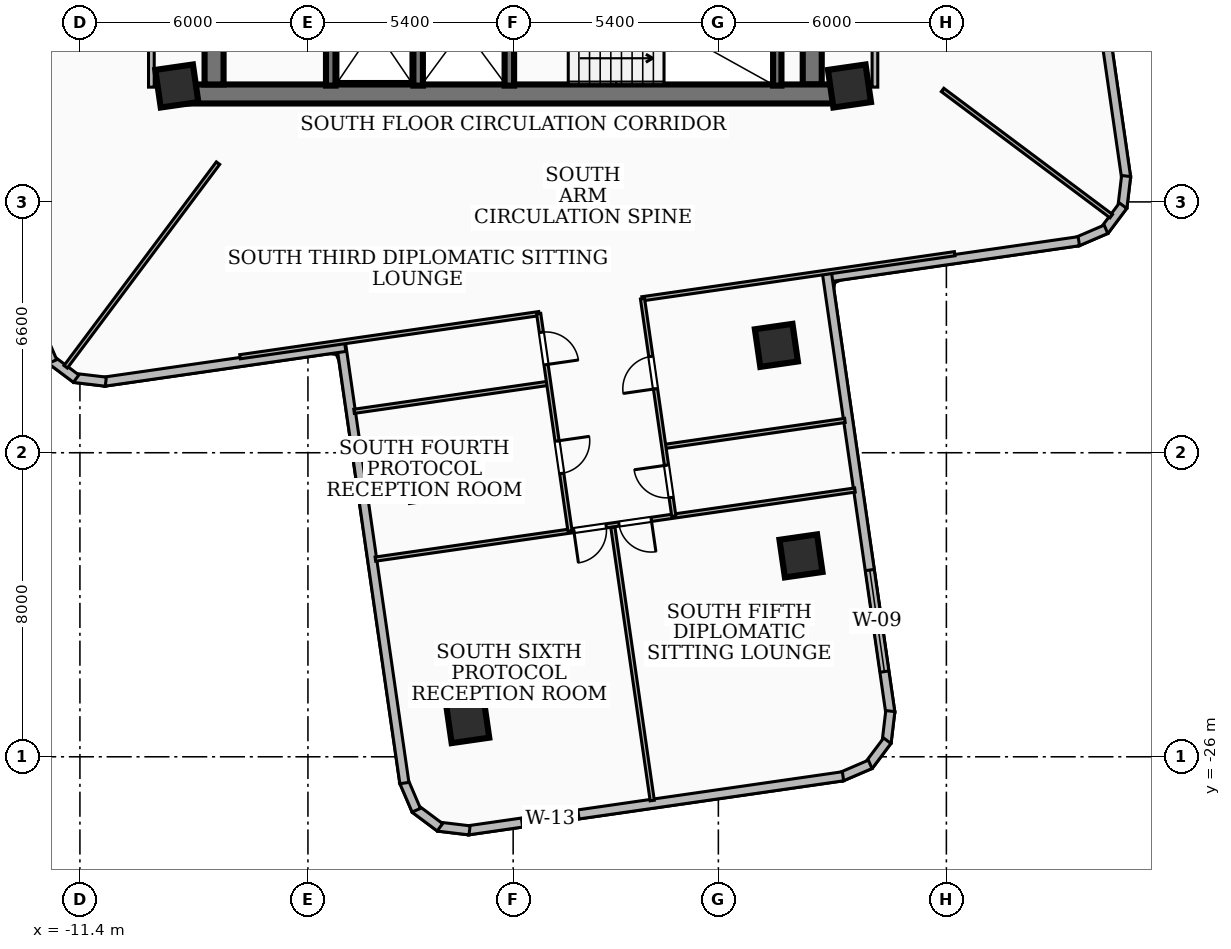
"""IFC4 building model, lengths in metres.
Left out: names, types, materials, properties, quantities, classifications, styles, units other than length and angle.
Written with IfcOpenShell. Run it as: python <this file> out.ifc"""

import sys

from ifc_helpers import new_model, si_unit, direction, frame, frame_2d, origin, origin_2d, place, context, subcontext, project, spatial, rectangle, extrude, element, fill, save


model = new_model("IFC4")
c1 = context("Model", 3, precision=1e-05, world=origin(), true_north=direction((0.0, 1.0)))
c2 = subcontext(c1, "Body", "Model", "MODEL_VIEW")
j1 = project(units=[si_unit("LENGTHUNIT", "METRE"), si_unit("PLANEANGLEUNIT", "RADIAN")], contexts=[c1])
p1 = place(None, origin())
s1 = spatial("IfcSite", under=j1, at=p1, CompositionType="ELEMENT")
p2 = place(p1, origin())
s2 = spatial("IfcBuilding", under=s1, at=p2, CompositionType="ELEMENT")
p3 = place(p2, frame((0.0, 0.0, 89.28)))
s3 = spatial("IfcBuildingStorey", under=s2, at=p3, CompositionType="ELEMENT", Elevation=89.28)
p4 = place(p3, frame((8.78, -8.56, 0.0), z_axis=(0.0, 0.0, 1.0), x_axis=(-1.0, 0.0, 0.0)))
e1 = element("IfcWall", 1, at=p4, inside=s3, PredefinedType="SHEAR", context=c2, shape_type="SweptSolid", body=[
    extrude(rectangle(XDim=17.56, YDim=0.5, at=frame_2d((8.78, 0.0))), origin(), (0.0, 0.0, 1.0), 3.34),
])
for number, where, z_axis, x_axis in (
    (2, (-7.87, -8.31, 0.0), (0.0, 0.0, 1.0), (0.0, 1.0, 0.0)),
    (3, (7.87, -2.0, 0.0), (0.0, 0.0, 1.0), (0.0, -1.0, 0.0)),
):
    element("IfcWall", number, at=place(p3, frame(where, z_axis=z_axis, x_axis=x_axis)), inside=s3, PredefinedType="SHEAR", context=c2, shape_type="SweptSolid", body=[
        extrude(rectangle(XDim=6.31, YDim=0.5, at=frame_2d((3.155, 0.0))), origin(), (0.0, 0.0, 1.0), 3.34),
    ])
p5 = place(p3, frame((6.95, -8.34, 0.0), z_axis=(0.0, 0.0, 1.0), x_axis=(0.0, 1.0, 0.0)))
e4 = element("IfcWall", 4, at=p5, inside=s3, PredefinedType="SOLIDWALL", context=c2, shape_type="SweptSolid", body=[
    extrude(rectangle(XDim=3.06, YDim=0.22, at=frame_2d((1.53, 0.0))), origin(), (0.0, 0.0, 1.0), 3.34),
])
for number, where, z_axis, x_axis in (
    (5, (-0.1, -8.34, 0.0), (0.0, 0.0, 1.0), (0.0, 1.0, 0.0)),
    (6, (-2.5, -8.34, 0.0), (0.0, 0.0, 1.0), (0.0, 1.0, 0.0)),
    (7, (-4.8, -8.34, 0.0), (0.0, 0.0, 1.0), (0.0, 1.0, 0.0)),
):
    element("IfcWall", number, at=place(p3, frame(where, z_axis=z_axis, x_axis=x_axis)), inside=s3, PredefinedType="SOLIDWALL", context=c2, shape_type="SweptSolid", body=[
        extrude(rectangle(XDim=3.04, YDim=0.25, at=frame_2d((1.52, 0.0))), origin(), (0.0, 0.0, 1.0), 3.34),
    ])
for number, where, z_axis, x_axis in (
    (8, (8.85, -8.35, 0.0), (0.0, 0.0, 1.0), (0.99, 0.143, 0.0)),
    (9, (-8.85, -8.35, 0.0), (0.0, 0.0, 1.0), (0.99, 0.143, 0.0)),
    (10, (-2.271, -18.724, 0.0), (0.0, 0.0, 1.0), (0.99, 0.143, 0.0)),
    (11, (6.927, -15.175, 0.0), (0.0, 0.0, 1.0), (0.99, 0.143, 0.0)),
    (12, (-1.195, -25.074, 0.0), (0.0, 0.0, 1.0), (0.99, 0.143, 0.0)),
    (13, (7.574, -20.714, 0.0), (0.0, 0.0, 1.0), (0.99, 0.143, 0.0)),
):
    element("IfcColumn", number, at=place(p3, frame(where, z_axis=z_axis, x_axis=x_axis)), inside=s3, PredefinedType="COLUMN", context=c2, shape_type="SweptSolid", body=[
        extrude(rectangle(XDim=1.0, YDim=1.0, at=origin_2d()), origin(), (0.0, 0.0, 1.0), 3.6),
    ])
p6 = place(p3, frame((15.215, -4.419, 0.0), z_axis=(0.0, 0.0, 1.0), x_axis=(0.14277438433, -0.989755260243, 0.0)))
e14 = element("IfcWall", 14, at=p6, inside=s3, PredefinedType="SOLIDWALL", context=c2, shape_type="SweptSolid", body=[
    extrude(rectangle(XDim=6.416, YDim=0.24, at=frame_2d((3.208, 0.0))), origin(), (0.0, 0.0, 1.0), 3.34),
])
p7 = place(p3, frame((16.13, -10.719, 0.0), z_axis=(0.0, 0.0, 1.0), x_axis=(-0.117847211411, -0.993031739051, 0.0)))
e15 = element("IfcWall", 15, at=p7, inside=s3, PredefinedType="SOLIDWALL", context=c2, shape_type="SweptSolid", body=[
    extrude(rectangle(XDim=0.831, YDim=0.24, at=frame_2d((0.416, 0.0))), origin(), (0.0, 0.0, 1.0), 3.34),
])
p8 = place(p3, frame((16.05, -11.499, 0.0), z_axis=(0.0, 0.0, 1.0), x_axis=(-0.599903963027, -0.800072018724, 0.0)))
e16 = element("IfcWall", 16, at=p8, inside=s3, PredefinedType="SOLIDWALL", context=c2, shape_type="SweptSolid", body=[
    extrude(rectangle(XDim=0.813, YDim=0.24, at=frame_2d((0.407, 0.0))), origin(), (0.0, 0.0, 1.0), 3.34),
])
p9 = place(p3, frame((15.6, -12.12, 0.0), z_axis=(0.0, 0.0, 1.0), x_axis=(-0.918795004047, -0.394735025731, 0.0)))
e17 = element("IfcWall", 17, at=p9, inside=s3, PredefinedType="SOLIDWALL", context=c2, shape_type="SweptSolid", body=[
    extrude(rectangle(XDim=0.831, YDim=0.24, at=frame_2d((0.415, 0.0))), origin(), (0.0, 0.0, 1.0), 3.34),
])
p10 = place(p3, frame((14.885, -12.434, 0.0), z_axis=(0.0, 0.0, 1.0), x_axis=(-0.989767068769, -0.142692500085, 0.0)))
e18 = element("IfcWall", 18, at=p10, inside=s3, PredefinedType="SOLIDWALL", context=c2, shape_type="SweptSolid", body=[
    extrude(rectangle(XDim=6.775, YDim=0.24, at=frame_2d((3.388, 0.0))), origin(), (0.0, 0.0, 1.0), 3.34),
])
p11 = place(p3, frame((8.26, -13.292, 0.0), z_axis=(0.0, 0.0, 1.0), x_axis=(0.142694701612, -0.989766751377, 0.0)))
e19 = element("IfcWall", 19, at=p11, inside=s3, PredefinedType="SOLIDWALL", context=c2, shape_type="SweptSolid", body=[
    extrude(rectangle(XDim=11.675, YDim=0.24, at=frame_2d((5.838, 0.0))), origin(), (0.0, 0.0, 1.0), 3.34),
])
p12 = place(p11, frame((7.875, 0.0, 0.85)))
e20 = element("IfcOpeningElement", 20, at=p12, cuts=e19, PredefinedType="OPENING", context=c2, shape_type="SweptSolid", body=[
    extrude(rectangle(XDim=2.7, YDim=1.65, at=frame_2d((1.35, 0.825))), frame((0.0, 0.13, 0.0), z_axis=(0.0, -1.0, 0.0), x_axis=(1.0, 0.0, 0.0)), (0.0, 0.0, 1.0), 0.26),
])
p13 = place(p3, frame((9.925, -24.798, 0.0), z_axis=(0.0, 0.0, 1.0), x_axis=(-0.118136998224, -0.992997305963, 0.0)))
e21 = element("IfcWall", 21, at=p13, inside=s3, PredefinedType="SOLIDWALL", context=c2, shape_type="SweptSolid", body=[
    extrude(rectangle(XDim=0.831, YDim=0.24, at=frame_2d((0.416, 0.0))), origin(), (0.0, 0.0, 1.0), 3.34),
])
p14 = place(p3, frame((9.845, -25.578, 0.0), z_axis=(0.0, 0.0, 1.0), x_axis=(-0.599759949003, -0.800179981986, 0.0)))
e22 = element("IfcWall", 22, at=p14, inside=s3, PredefinedType="SOLIDWALL", context=c2, shape_type="SweptSolid", body=[
    extrude(rectangle(XDim=0.814, YDim=0.24, at=frame_2d((0.407, 0.0))), origin(), (0.0, 0.0, 1.0), 3.34),
])
p15 = place(p3, frame((9.395, -26.199, 0.0), z_axis=(0.0, 0.0, 1.0), x_axis=(-0.91864251547, -0.395089773053, 0.0)))
e23 = element("IfcWall", 23, at=p15, inside=s3, PredefinedType="SOLIDWALL", context=c2, shape_type="SweptSolid", body=[
    extrude(rectangle(XDim=0.831, YDim=0.24, at=frame_2d((0.415, 0.0))), origin(), (0.0, 0.0, 1.0), 3.34),
])
p16 = place(p3, frame((8.68, -26.513, 0.0), z_axis=(0.0, 0.0, 1.0), x_axis=(-0.98976517122, -0.142705661552, 0.0)))
e24 = element("IfcWall", 24, at=p16, inside=s3, PredefinedType="SOLIDWALL", context=c2, shape_type="SweptSolid", body=[
    extrude(rectangle(XDim=9.979, YDim=0.24, at=frame_2d((4.99, 0.0))), origin(), (0.0, 0.0, 1.0), 3.34),
])
p17 = place(p16, frame((7.034, 0.0, 0.85)))
e25 = element("IfcOpeningElement", 25, at=p17, cuts=e24, PredefinedType="OPENING", context=c2, shape_type="SweptSolid", body=[
    extrude(rectangle(XDim=1.5, YDim=1.8, at=frame_2d((0.75, 0.9))), frame((0.0, 0.13, 0.0), z_axis=(0.0, -1.0, 0.0), x_axis=(1.0, 0.0, 0.0)), (0.0, 0.0, 1.0), 0.26),
])
p18 = place(p3, frame((-1.147, -27.936, 0.0), z_axis=(0.0, 0.0, 1.0), x_axis=(-0.992858752215, 0.119295842971, 0.0)))
e26 = element("IfcWall", 26, at=p18, inside=s3, PredefinedType="SOLIDWALL", context=c2, shape_type="SweptSolid", body=[
    extrude(rectangle(XDim=0.831, YDim=0.24, at=frame_2d((0.416, 0.0))), origin(), (0.0, 0.0, 1.0), 3.34),
])
p19 = place(p3, frame((-1.927, -27.855, 0.0), z_axis=(0.0, 0.0, 1.0), x_axis=(-0.801186263659, 0.598415049045, 0.0)))
e27 = element("IfcWall", 27, at=p19, inside=s3, PredefinedType="SOLIDWALL", context=c2, shape_type="SweptSolid", body=[
    extrude(rectangle(XDim=0.814, YDim=0.24, at=frame_2d((0.407, 0.0))), origin(), (0.0, 0.0, 1.0), 3.34),
])
p20 = place(p3, frame((-2.549, -27.406, 0.0), z_axis=(0.0, 0.0, 1.0), x_axis=(-0.393848299024, 0.919175455153, 0.0)))
e28 = element("IfcWall", 28, at=p20, inside=s3, PredefinedType="SOLIDWALL", context=c2, shape_type="SweptSolid", body=[
    extrude(rectangle(XDim=0.83, YDim=0.24, at=frame_2d((0.415, 0.0))), origin(), (0.0, 0.0, 1.0), 3.34),
])
p21 = place(p3, frame((-2.862, -26.691, 0.0), z_axis=(0.0, 0.0, 1.0), x_axis=(-0.142682889326, 0.989768454283, 0.0)))
e29 = element("IfcWall", 29, at=p21, inside=s3, PredefinedType="SOLIDWALL", context=c2, shape_type="SweptSolid", body=[
    extrude(rectangle(XDim=11.676, YDim=0.24, at=frame_2d((5.838, 0.0))), origin(), (0.0, 0.0, 1.0), 2.486),
])
p22 = place(p3, frame((-4.419, -15.215, 0.0), z_axis=(0.0, 0.0, 1.0), x_axis=(-0.989755260243, -0.14277438433, 0.0)))
e30 = element("IfcWall", 30, at=p22, inside=s3, PredefinedType="SOLIDWALL", context=c2, shape_type="SweptSolid", body=[
    extrude(rectangle(XDim=6.416, YDim=0.24, at=frame_2d((3.208, 0.0))), origin(), (0.0, 0.0, 1.0), 2.486),
])
p23 = place(p3, frame((-10.719, -16.13, 0.0), z_axis=(0.0, 0.0, 1.0), x_axis=(-0.993031739051, 0.117847211411, 0.0)))
e31 = element("IfcWall", 31, at=p23, inside=s3, PredefinedType="SOLIDWALL", context=c2, shape_type="SweptSolid", body=[
    extrude(rectangle(XDim=0.831, YDim=0.24, at=frame_2d((0.416, 0.0))), origin(), (0.0, 0.0, 1.0), 3.34),
])
p24 = place(p3, frame((-11.499, -16.05, 0.0), z_axis=(0.0, 0.0, 1.0), x_axis=(-0.800072018724, 0.599903963027, 0.0)))
e32 = element("IfcWall", 32, at=p24, inside=s3, PredefinedType="SOLIDWALL", context=c2, shape_type="SweptSolid", body=[
    extrude(rectangle(XDim=0.813, YDim=0.24, at=frame_2d((0.407, 0.0))), origin(), (0.0, 0.0, 1.0), 3.34),
])
p25 = place(p3, frame((-12.12, -15.6, 0.0), z_axis=(0.0, 0.0, 1.0), x_axis=(-0.394735025731, 0.918795004047, 0.0)))
e33 = element("IfcWall", 33, at=p25, inside=s3, PredefinedType="SOLIDWALL", context=c2, shape_type="SweptSolid", body=[
    extrude(rectangle(XDim=0.831, YDim=0.24, at=frame_2d((0.415, 0.0))), origin(), (0.0, 0.0, 1.0), 3.34),
])
for number, where, z_axis, x_axis in (
    (34, (-9.52, -8.38, 0.0), (0.0, 0.0, 1.0), (0.0, 1.0, 0.0)),
    (35, (9.52, -8.38, 0.0), (0.0, 0.0, 1.0), (0.0, 1.0, 0.0)),
):
    element("IfcWall", number, at=place(p3, frame(where, z_axis=z_axis, x_axis=x_axis)), inside=s3, PredefinedType="PARTITIONING", context=c2, shape_type="SweptSolid", body=[
        extrude(rectangle(XDim=6.63, YDim=0.15, at=frame_2d((3.315, 0.0))), origin(), (0.0, 0.0, 1.0), 2.486),
    ])
p26 = place(p3, frame((-7.766, -10.38, 0.0), z_axis=(0.0, 0.0, 1.0), x_axis=(-0.598966195252, -0.800774310867, 0.0)))
e36 = element("IfcWall", 36, at=p26, inside=s3, PredefinedType="PARTITIONING", context=c2, shape_type="SweptSolid", body=[
    extrude(rectangle(XDim=6.691, YDim=0.11, at=frame_2d((3.346, 0.0))), origin(), (0.0, 0.0, 1.0), 2.644),
])
p27 = place(p3, frame((11.3, -8.454, 0.0), z_axis=(0.0, 0.0, 1.0), x_axis=(0.80074999449, -0.598998703107, 0.0)))
e37 = element("IfcWall", 37, at=p27, inside=s3, PredefinedType="PARTITIONING", context=c2, shape_type="SweptSolid", body=[
    extrude(rectangle(XDim=5.542, YDim=0.11, at=frame_2d((2.771, 0.0))), origin(), (0.0, 0.0, 1.0), 3.34),
])
p28 = place(p3, frame((3.394, -13.949, 0.0), z_axis=(0.0, 0.0, 1.0), x_axis=(0.989762369657, 0.142725091033, 0.0)))
e38 = element("IfcWall", 38, at=p28, inside=s3, PredefinedType="PARTITIONING", context=c2, shape_type="SweptSolid", body=[
    extrude(rectangle(XDim=8.31, YDim=0.11, at=frame_2d((4.155, 0.0))), origin(), (0.0, 0.0, 1.0), 2.486),
])
p29 = place(p3, frame((-7.186, -15.474, 0.0), z_axis=(0.0, 0.0, 1.0), x_axis=(0.989754461648, 0.142779920322, 0.0)))
e39 = element("IfcWall", 39, at=p29, inside=s3, PredefinedType="PARTITIONING", context=c2, shape_type="SweptSolid", body=[
    extrude(rectangle(XDim=7.949, YDim=0.11, at=frame_2d((3.975, 0.0))), origin(), (0.0, 0.0, 1.0), 2.486),
])
p30 = place(p3, frame((3.984, -17.834, 0.0), z_axis=(0.0, 0.0, 1.0), x_axis=(0.989771535394, 0.142661514515, 0.0)))
e40 = element("IfcWall", 40, at=p30, inside=s3, PredefinedType="PARTITIONING", context=c2, shape_type="SweptSolid", body=[
    extrude(rectangle(XDim=4.795, YDim=0.11, at=frame_2d((2.397, 0.0))), origin(), (0.0, 0.0, 1.0), 2.486),
])
p31 = place(p3, frame((-4.186, -16.91, 0.0), z_axis=(0.0, 0.0, 1.0), x_axis=(0.989785908973, 0.142561756436, 0.0)))
e41 = element("IfcWall", 41, at=p31, inside=s3, PredefinedType="PARTITIONING", context=c2, shape_type="SweptSolid", body=[
    extrude(rectangle(XDim=5.155, YDim=0.11, at=frame_2d((2.577, 0.0))), origin(), (0.0, 0.0, 1.0), 2.486),
])
p32 = place(p3, frame((4.228, -19.668, 0.0), z_axis=(0.0, 0.0, 1.0), x_axis=(-0.142556647725, 0.989786644782, 0.0)))
e42 = element("IfcWall", 42, at=p32, inside=s3, PredefinedType="PARTITIONING", context=c2, shape_type="SweptSolid", body=[
    extrude(rectangle(XDim=5.78, YDim=0.11, at=frame_2d((2.89, 0.0))), origin(), (0.0, 0.0, 1.0), 3.34),
])
p33 = place(p32, frame((3.385, 0.0, 0.0)))
e43 = element("IfcOpeningElement", 43, at=p33, cuts=e42, PredefinedType="OPENING", context=c2, shape_type="SweptSolid", body=[
    extrude(rectangle(XDim=0.86, YDim=2.04, at=frame_2d((0.43, 1.02))), frame((0.0, 0.065, 0.0), z_axis=(0.0, -1.0, 0.0), x_axis=(1.0, 0.0, 0.0)), (0.0, 0.0, 1.0), 0.13),
])
p34 = place(p32, frame((0.495, 0.0, 0.0)))
e44 = element("IfcOpeningElement", 44, at=p34, cuts=e42, PredefinedType="OPENING", context=c2, shape_type="SweptSolid", body=[
    extrude(rectangle(XDim=0.86, YDim=2.04, at=frame_2d((0.43, 1.02))), frame((0.0, 0.065, 0.0), z_axis=(0.0, -1.0, 0.0), x_axis=(1.0, 0.0, 0.0)), (0.0, 0.0, 1.0), 0.13),
])
p35 = place(p3, frame((0.672, -14.341, 0.0), z_axis=(0.0, 0.0, 1.0), x_axis=(0.142722164178, -0.989762791709, 0.0)))
e45 = element("IfcWall", 45, at=p35, inside=s3, PredefinedType="PARTITIONING", context=c2, shape_type="SweptSolid", body=[
    extrude(rectangle(XDim=5.78, YDim=0.11, at=frame_2d((2.89, 0.0))), origin(), (0.0, 0.0, 1.0), 3.34),
])
p36 = place(p35, frame((0.495, 0.0, 0.0)))
e46 = element("IfcOpeningElement", 46, at=p36, cuts=e45, PredefinedType="OPENING", context=c2, shape_type="SweptSolid", body=[
    extrude(rectangle(XDim=0.86, YDim=2.04, at=frame_2d((0.43, 1.02))), frame((0.0, 0.065, 0.0), z_axis=(0.0, -1.0, 0.0), x_axis=(1.0, 0.0, 0.0)), (0.0, 0.0, 1.0), 0.13),
])
p37 = place(p35, frame((3.385, 0.0, 0.0)))
e47 = element("IfcOpeningElement", 47, at=p37, cuts=e45, PredefinedType="OPENING", context=c2, shape_type="SweptSolid", body=[
    extrude(rectangle(XDim=0.86, YDim=2.04, at=frame_2d((0.43, 1.02))), frame((0.0, 0.065, 0.0), z_axis=(0.0, -1.0, 0.0), x_axis=(1.0, 0.0, 0.0)), (0.0, 0.0, 1.0), 0.13),
])
p38 = place(p3, frame((2.624, -19.96, 0.0), z_axis=(0.0, 0.0, 1.0), x_axis=(0.142583297559, -0.989782806103, 0.0)))
e48 = element("IfcWall", 48, at=p38, inside=s3, PredefinedType="PARTITIONING", context=c2, shape_type="SweptSolid", body=[
    extrude(rectangle(XDim=7.265, YDim=0.11, at=frame_2d((3.633, 0.0))), origin(), (0.0, 0.0, 1.0), 2.832),
])
p39 = place(p3, frame((8.994, -18.981, 0.0), z_axis=(0.0, 0.0, 1.0), x_axis=(-0.989779502996, -0.14260622514, 0.0)))
e49 = element("IfcWall", 49, at=p39, inside=s3, PredefinedType="PARTITIONING", context=c2, shape_type="SweptSolid", body=[
    extrude(rectangle(XDim=12.749, YDim=0.11, at=frame_2d((6.375, 0.0))), origin(), (0.0, 0.0, 1.0), 2.486),
])
p40 = place(p39, frame((6.615, 0.0, 0.0)))
e50 = element("IfcOpeningElement", 50, at=p40, cuts=e49, PredefinedType="OPENING", context=c2, shape_type="SweptSolid", body=[
    extrude(rectangle(XDim=0.86, YDim=2.04, at=frame_2d((0.43, 1.02))), frame((0.0, 0.065, 0.0), z_axis=(0.0, -1.0, 0.0), x_axis=(1.0, 0.0, 0.0)), (0.0, 0.0, 1.0), 0.13),
])
p41 = place(p39, frame((5.415, 0.0, 0.0)))
e51 = element("IfcOpeningElement", 51, at=p41, cuts=e49, PredefinedType="OPENING", context=c2, shape_type="SweptSolid", body=[
    extrude(rectangle(XDim=0.86, YDim=2.04, at=frame_2d((0.43, 1.02))), frame((0.0, 0.065, 0.0), z_axis=(0.0, -1.0, 0.0), x_axis=(1.0, 0.0, 0.0)), (0.0, 0.0, 1.0), 0.13),
])
p42 = place(p12, origin())
e52 = element("IfcWindow", 52, at=p42, inside=s3, PartitioningType="SINGLE_PANEL", PredefinedType="WINDOW", context=c2, shape_type="SweptSolid", body=[
    extrude(rectangle(XDim=2.7, YDim=1.65, at=frame_2d((1.35, 0.825))), frame((0.0, 0.03, 0.0), z_axis=(0.0, -1.0, 0.0), x_axis=(1.0, 0.0, 0.0)), (0.0, 0.0, 1.0), 0.06),
])
fill(e20, e52)
p43 = place(p17, origin())
e53 = element("IfcWindow", 53, at=p43, inside=s3, PartitioningType="SINGLE_PANEL", PredefinedType="WINDOW", context=c2, shape_type="SweptSolid", body=[
    extrude(rectangle(XDim=1.5, YDim=1.8, at=frame_2d((0.75, 0.9))), frame((0.0, 0.03, 0.0), z_axis=(0.0, -1.0, 0.0), x_axis=(1.0, 0.0, 0.0)), (0.0, 0.0, 1.0), 0.06),
])
fill(e25, e53)
p44 = place(p33, origin())
e54 = element("IfcDoor", 54, at=p44, inside=s3, OperationType="SINGLE_SWING_LEFT", PredefinedType="DOOR", context=c2, shape_type="SweptSolid", body=[
    extrude(rectangle(XDim=0.86, YDim=2.04, at=frame_2d((0.43, 1.02))), frame((0.0, 0.025, 0.0), z_axis=(0.0, -1.0, 0.0), x_axis=(1.0, 0.0, 0.0)), (0.0, 0.0, 1.0), 0.05),
])
fill(e43, e54)
p45 = place(p34, origin())
e55 = element("IfcDoor", 55, at=p45, inside=s3, OperationType="SINGLE_SWING_RIGHT", PredefinedType="DOOR", context=c2, shape_type="SweptSolid", body=[
    extrude(rectangle(XDim=0.86, YDim=2.04, at=frame_2d((0.43, 1.02))), frame((0.0, 0.025, 0.0), z_axis=(0.0, -1.0, 0.0), x_axis=(1.0, 0.0, 0.0)), (0.0, 0.0, 1.0), 0.05),
])
fill(e44, e55)
p46 = place(p36, origin())
e56 = element("IfcDoor", 56, at=p46, inside=s3, OperationType="SINGLE_SWING_RIGHT", PredefinedType="DOOR", context=c2, shape_type="SweptSolid", body=[
    extrude(rectangle(XDim=0.86, YDim=2.04, at=frame_2d((0.43, 1.02))), frame((0.0, 0.025, 0.0), z_axis=(0.0, -1.0, 0.0), x_axis=(1.0, 0.0, 0.0)), (0.0, 0.0, 1.0), 0.05),
])
fill(e46, e56)
p47 = place(p37, origin())
e57 = element("IfcDoor", 57, at=p47, inside=s3, OperationType="SINGLE_SWING_LEFT", PredefinedType="DOOR", context=c2, shape_type="SweptSolid", body=[
    extrude(rectangle(XDim=0.86, YDim=2.04, at=frame_2d((0.43, 1.02))), frame((0.0, 0.025, 0.0), z_axis=(0.0, -1.0, 0.0), x_axis=(1.0, 0.0, 0.0)), (0.0, 0.0, 1.0), 0.05),
])
fill(e47, e57)
p48 = place(p40, origin())
e58 = element("IfcDoor", 58, at=p48, inside=s3, OperationType="SINGLE_SWING_RIGHT", PredefinedType="DOOR", context=c2, shape_type="SweptSolid", body=[
    extrude(rectangle(XDim=0.86, YDim=2.04, at=frame_2d((0.43, 1.02))), frame((0.0, 0.025, 0.0), z_axis=(0.0, -1.0, 0.0), x_axis=(1.0, 0.0, 0.0)), (0.0, 0.0, 1.0), 0.05),
])
fill(e50, e58)
p49 = place(p41, origin())
e59 = element("IfcDoor", 59, at=p49, inside=s3, OperationType="SINGLE_SWING_LEFT", PredefinedType="DOOR", context=c2, shape_type="SweptSolid", body=[
    extrude(rectangle(XDim=0.86, YDim=2.04, at=frame_2d((0.43, 1.02))), frame((0.0, 0.025, 0.0), z_axis=(0.0, -1.0, 0.0), x_axis=(1.0, 0.0, 0.0)), (0.0, 0.0, 1.0), 0.05),
])
fill(e51, e59)
save(model, sys.argv[1])
